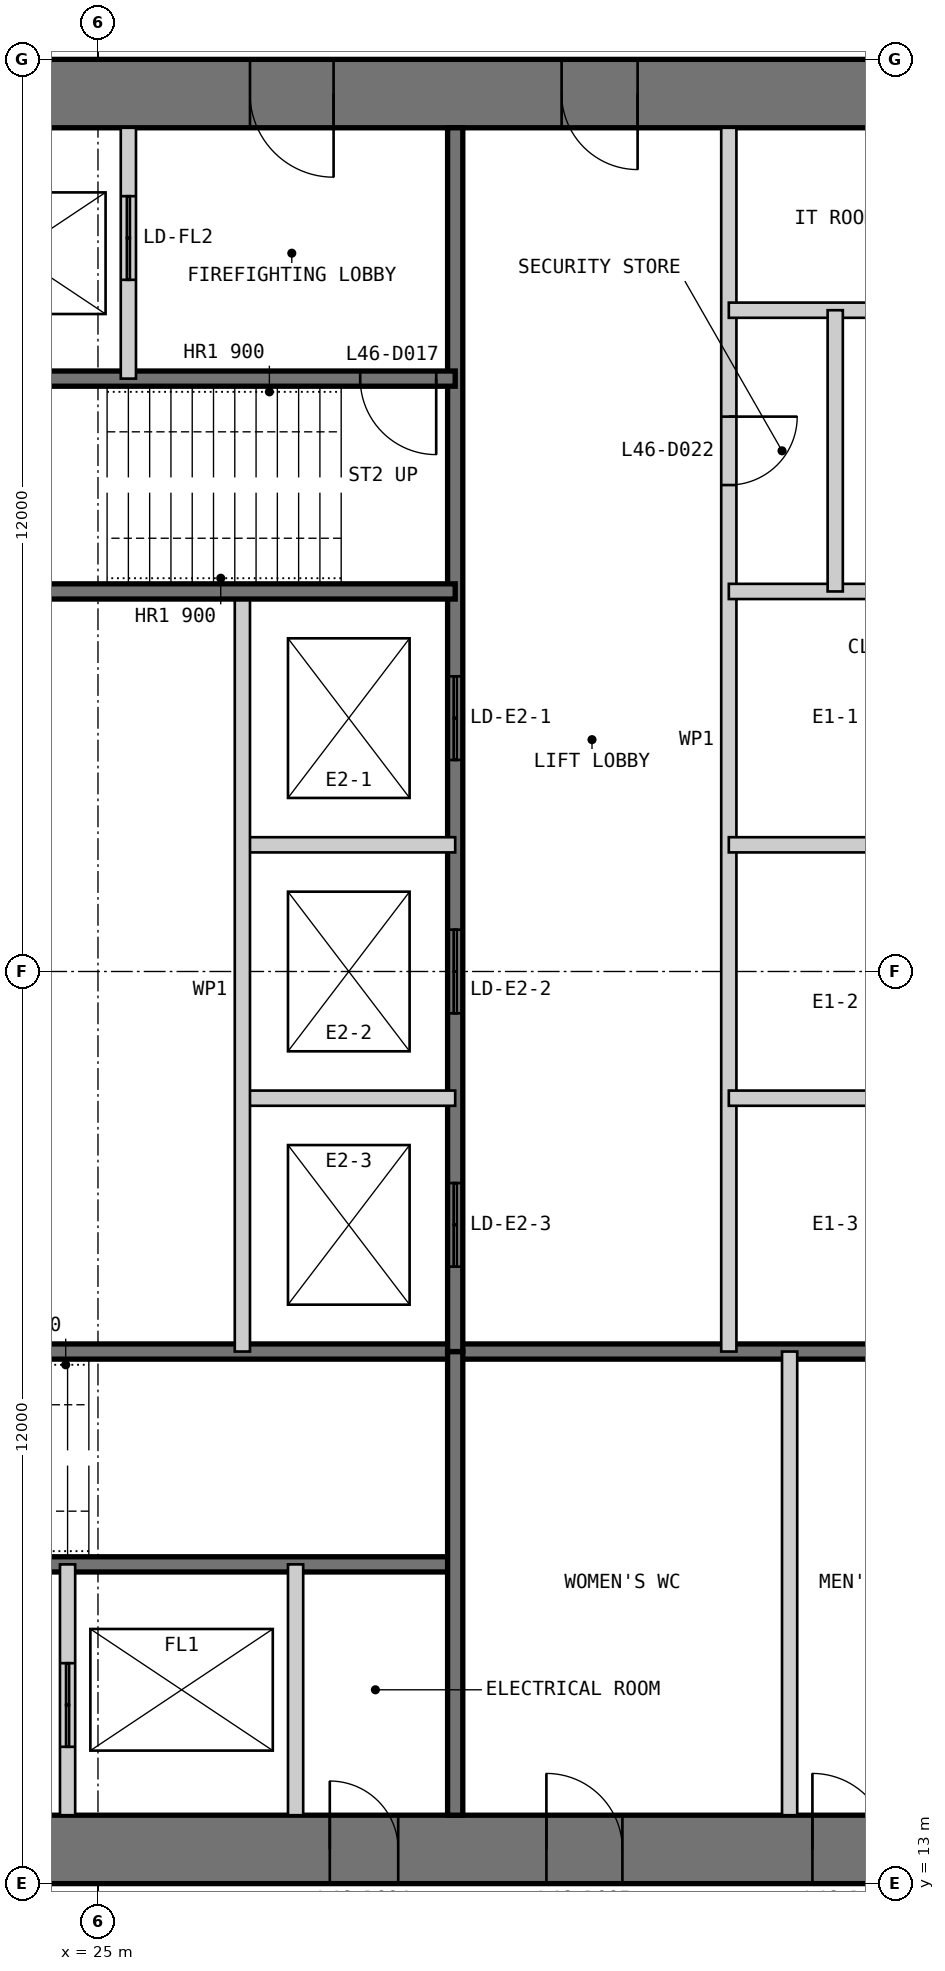
"""IFC4 building model, lengths in metres.
Left out: names, types, materials, properties, quantities, classifications, styles, units other than length and angle.
Written with IfcOpenShell. Run it as: python <this file> out.ifc"""

import sys

from ifc_helpers import new_model, si_unit, direction, frame, frame_2d, origin, place, context, subcontext, project, spatial, polyline, rectangle, outline, extrude, element, fill, save


model = new_model("IFC4")
c1 = context("Model", 3, precision=1e-05, world=origin(), true_north=direction((0.0, 1.0)))
c2 = subcontext(c1, "Body", "Model", "MODEL_VIEW")
j1 = project(units=[si_unit("LENGTHUNIT", "METRE"), si_unit("PLANEANGLEUNIT", "RADIAN")], contexts=[c1])
p1 = place(None, origin())
s1 = spatial("IfcSite", under=j1, at=p1, CompositionType="ELEMENT")
p2 = place(p1, origin())
s2 = spatial("IfcBuilding", under=s1, at=p2, CompositionType="ELEMENT")
p3 = place(p2, frame((0.0, 0.0, 197.8)))
s3 = spatial("IfcBuildingStorey", under=s2, at=p3, CompositionType="ELEMENT", Elevation=197.8)
p4 = place(p3, frame((13.0, 13.45, 0.0), z_axis=(0.0, 0.0, 1.0), x_axis=(1.0, 0.0, 0.0)))
e1 = element("IfcWall", 1, at=p4, inside=s3, PredefinedType="SHEAR", context=c2, shape_type="SweptSolid", body=[
    extrude(outline(polyline([(0.0, -0.45), (24.0, -0.45), (23.1, 0.45), (0.9, 0.45), (0.0, -0.45)])), origin(), (0.0, 0.0, 1.0), 4.0),
])
p5 = place(p4, frame((4.9, 0.0, 0.0)))
e2 = element("IfcOpeningElement", 2, at=p5, cuts=e1, PredefinedType="OPENING", context=c2, shape_type="SweptSolid", body=[
    extrude(rectangle(XDim=1.0, YDim=2.2, at=frame_2d((0.5, 1.1))), frame((0.0, 0.46, 0.0), z_axis=(0.0, -1.0, 0.0), x_axis=(1.0, 0.0, 0.0)), (0.0, 0.0, 1.0), 0.92),
])
p6 = place(p4, frame((8.9, 0.0, 0.0)))
e3 = element("IfcOpeningElement", 3, at=p6, cuts=e1, PredefinedType="OPENING", context=c2, shape_type="SweptSolid", body=[
    extrude(rectangle(XDim=1.1, YDim=2.2, at=frame_2d((0.55, 1.1))), frame((0.0, 0.46, 0.0), z_axis=(0.0, -1.0, 0.0), x_axis=(1.0, 0.0, 0.0)), (0.0, 0.0, 1.0), 0.92),
])
p7 = place(p4, frame((15.05, 0.0, 0.0)))
e4 = element("IfcOpeningElement", 4, at=p7, cuts=e1, PredefinedType="OPENING", context=c2, shape_type="SweptSolid", body=[
    extrude(rectangle(XDim=0.9, YDim=2.2, at=frame_2d((0.45, 1.1))), frame((0.0, 0.46, 0.0), z_axis=(0.0, -1.0, 0.0), x_axis=(1.0, 0.0, 0.0)), (0.0, 0.0, 1.0), 0.92),
])
p8 = place(p4, frame((17.9, 0.0, 0.0)))
e5 = element("IfcOpeningElement", 5, at=p8, cuts=e1, PredefinedType="OPENING", context=c2, shape_type="SweptSolid", body=[
    extrude(rectangle(XDim=1.0, YDim=2.2, at=frame_2d((0.5, 1.1))), frame((0.0, 0.46, 0.0), z_axis=(0.0, -1.0, 0.0), x_axis=(1.0, 0.0, 0.0)), (0.0, 0.0, 1.0), 0.92),
])
p9 = place(p4, frame((21.4, 0.0, 0.0)))
e6 = element("IfcOpeningElement", 6, at=p9, cuts=e1, PredefinedType="OPENING", context=c2, shape_type="SweptSolid", body=[
    extrude(rectangle(XDim=1.0, YDim=2.2, at=frame_2d((0.5, 1.1))), frame((0.0, 0.46, 0.0), z_axis=(0.0, -1.0, 0.0), x_axis=(1.0, 0.0, 0.0)), (0.0, 0.0, 1.0), 0.92),
])
p10 = place(p3, frame((37.0, 36.55, 0.0), z_axis=(0.0, 0.0, 1.0), x_axis=(-1.0, 0.0, 0.0)))
e7 = element("IfcWall", 7, at=p10, inside=s3, PredefinedType="SHEAR", context=c2, shape_type="SweptSolid", body=[
    extrude(outline(polyline([(0.0, -0.45), (24.0, -0.45), (23.1, 0.45), (0.9, 0.45), (0.0, -0.45)])), origin(), (0.0, 0.0, 1.0), 4.0),
])
p11 = place(p10, frame((4.9, 0.0, 0.0)))
e8 = element("IfcOpeningElement", 8, at=p11, cuts=e7, PredefinedType="OPENING", context=c2, shape_type="SweptSolid", body=[
    extrude(rectangle(XDim=1.0, YDim=2.2, at=frame_2d((0.5, 1.1))), frame((0.0, 0.46, 0.0), z_axis=(0.0, -1.0, 0.0), x_axis=(1.0, 0.0, 0.0)), (0.0, 0.0, 1.0), 0.92),
])
p12 = place(p10, frame((8.9, 0.0, 0.0)))
e9 = element("IfcOpeningElement", 9, at=p12, cuts=e7, PredefinedType="OPENING", context=c2, shape_type="SweptSolid", body=[
    extrude(rectangle(XDim=1.1, YDim=2.2, at=frame_2d((0.55, 1.1))), frame((0.0, 0.46, 0.0), z_axis=(0.0, -1.0, 0.0), x_axis=(1.0, 0.0, 0.0)), (0.0, 0.0, 1.0), 0.92),
])
p13 = place(p10, frame((15.05, 0.0, 0.0)))
e10 = element("IfcOpeningElement", 10, at=p13, cuts=e7, PredefinedType="OPENING", context=c2, shape_type="SweptSolid", body=[
    extrude(rectangle(XDim=0.9, YDim=2.2, at=frame_2d((0.45, 1.1))), frame((0.0, 0.46, 0.0), z_axis=(0.0, -1.0, 0.0), x_axis=(1.0, 0.0, 0.0)), (0.0, 0.0, 1.0), 0.92),
])
p14 = place(p10, frame((17.9, 0.0, 0.0)))
e11 = element("IfcOpeningElement", 11, at=p14, cuts=e7, PredefinedType="OPENING", context=c2, shape_type="SweptSolid", body=[
    extrude(rectangle(XDim=1.0, YDim=2.2, at=frame_2d((0.5, 1.1))), frame((0.0, 0.46, 0.0), z_axis=(0.0, -1.0, 0.0), x_axis=(1.0, 0.0, 0.0)), (0.0, 0.0, 1.0), 0.92),
])
p15 = place(p10, frame((21.4, 0.0, 0.0)))
e12 = element("IfcOpeningElement", 12, at=p15, cuts=e7, PredefinedType="OPENING", context=c2, shape_type="SweptSolid", body=[
    extrude(rectangle(XDim=1.0, YDim=2.2, at=frame_2d((0.5, 1.1))), frame((0.0, 0.46, 0.0), z_axis=(0.0, -1.0, 0.0), x_axis=(1.0, 0.0, 0.0)), (0.0, 0.0, 1.0), 0.92),
])
p16 = place(p3, frame((20.3, 17.2, 0.0), z_axis=(0.0, 0.0, 1.0), x_axis=(1.0, 0.0, 0.0)))
e13 = element("IfcWall", 13, at=p16, inside=s3, PredefinedType="SOLIDWALL", context=c2, shape_type="SweptSolid", body=[
    extrude(rectangle(XDim=9.4, YDim=0.2, at=frame_2d((4.7, 0.0))), origin(), (0.0, 0.0, 1.0), 3.8),
])
p17 = place(p16, frame((0.25, 0.0, 0.0)))
e14 = element("IfcOpeningElement", 14, at=p17, cuts=e13, PredefinedType="OPENING", context=c2, shape_type="SweptSolid", body=[
    extrude(rectangle(XDim=1.0, YDim=2.2, at=frame_2d((0.5, 1.1))), frame((0.0, 0.11, 0.0), z_axis=(0.0, -1.0, 0.0), x_axis=(1.0, 0.0, 0.0)), (0.0, 0.0, 1.0), 0.22),
])
p18 = place(p3, frame((20.3, 20.0, 0.0), z_axis=(0.0, 0.0, 1.0), x_axis=(1.0, 0.0, 0.0)))
e15 = element("IfcWall", 15, at=p18, inside=s3, PredefinedType="SOLIDWALL", context=c2, shape_type="SweptSolid", body=[
    extrude(rectangle(XDim=15.8, YDim=0.2, at=frame_2d((7.9, 0.0))), origin(), (0.0, 0.0, 1.0), 3.8),
])
p19 = place(p3, frame((24.6, 13.9, 0.0), z_axis=(0.0, 0.0, 1.0), x_axis=(0.0, 1.0, 0.0)))
e16 = element("IfcWall", 16, at=p19, inside=s3, PredefinedType="PARTITIONING", context=c2, shape_type="SweptSolid", body=[
    extrude(rectangle(XDim=3.3, YDim=0.2, at=frame_2d((1.65, 0.0))), origin(), (0.0, 0.0, 1.0), 3.8),
])
p20 = place(p19, frame((0.9, 0.0, 0.0)))
e17 = element("IfcOpeningElement", 17, at=p20, cuts=e16, PredefinedType="OPENING", context=c2, shape_type="SweptSolid", body=[
    extrude(rectangle(XDim=1.1, YDim=2.2, at=frame_2d((0.55, 1.1))), frame((0.0, 0.11, 0.0), z_axis=(0.0, -1.0, 0.0), x_axis=(1.0, 0.0, 0.0)), (0.0, 0.0, 1.0), 0.22),
])
p21 = place(p3, frame((27.6, 13.9, 0.0), z_axis=(0.0, 0.0, 1.0), x_axis=(0.0, 1.0, 0.0)))
e18 = element("IfcWall", 18, at=p21, inside=s3, PredefinedType="PARTITIONING", context=c2, shape_type="SweptSolid", body=[
    extrude(rectangle(XDim=3.3, YDim=0.2, at=frame_2d((1.65, 0.0))), origin(), (0.0, 0.0, 1.0), 3.8),
])
p22 = place(p3, frame((29.7, 13.9, 0.0), z_axis=(0.0, 0.0, 1.0), x_axis=(0.0, 1.0, 0.0)))
e19 = element("IfcWall", 19, at=p22, inside=s3, PredefinedType="SOLIDWALL", context=c2, shape_type="SweptSolid", body=[
    extrude(rectangle(XDim=6.1, YDim=0.2, at=frame_2d((3.05, 0.0))), origin(), (0.0, 0.0, 1.0), 3.8),
])
p23 = place(p3, frame((34.1, 13.9, 0.0), z_axis=(0.0, 0.0, 1.0), x_axis=(0.0, 1.0, 0.0)))
e20 = element("IfcWall", 20, at=p23, inside=s3, PredefinedType="PARTITIONING", context=c2, shape_type="SweptSolid", body=[
    extrude(rectangle(XDim=6.1, YDim=0.2, at=frame_2d((3.05, 0.0))), origin(), (0.0, 0.0, 1.0), 3.8),
])
p24 = place(p3, frame((33.3, 36.1, 0.0), z_axis=(0.0, 0.0, 1.0), x_axis=(0.0, -1.0, 0.0)))
e21 = element("IfcWall", 21, at=p24, inside=s3, PredefinedType="PARTITIONING", context=c2, shape_type="SweptSolid", body=[
    extrude(rectangle(XDim=16.1, YDim=0.2, at=frame_2d((8.05, 0.0))), origin(), (0.0, 0.0, 1.0), 3.8),
])
p25 = place(p24, frame((3.8, 0.0, 0.0)))
e22 = element("IfcOpeningElement", 22, at=p25, cuts=e21, PredefinedType="OPENING", context=c2, shape_type="SweptSolid", body=[
    extrude(rectangle(XDim=0.9, YDim=2.2, at=frame_2d((0.45, 1.1))), frame((0.0, 0.11, 0.0), z_axis=(0.0, -1.0, 0.0), x_axis=(1.0, 0.0, 0.0)), (0.0, 0.0, 1.0), 0.22),
])
p26 = place(p3, frame((29.7, 36.1, 0.0), z_axis=(0.0, 0.0, 1.0), x_axis=(0.0, -1.0, 0.0)))
e23 = element("IfcWall", 23, at=p26, inside=s3, PredefinedType="SOLIDWALL", context=c2, shape_type="SweptSolid", body=[
    extrude(rectangle(XDim=16.1, YDim=0.2, at=frame_2d((8.05, 0.0))), origin(), (0.0, 0.0, 1.0), 3.8),
])
p27 = place(p26, frame((7.217, 0.0, 0.0)))
e24 = element("IfcOpeningElement", 24, at=p27, cuts=e23, PredefinedType="OPENING", context=c2, shape_type="SweptSolid", body=[
    extrude(rectangle(XDim=1.1, YDim=2.2, at=frame_2d((0.55, 1.1))), frame((0.0, 0.11, 0.0), z_axis=(0.0, -1.0, 0.0), x_axis=(1.0, 0.0, 0.0)), (0.0, 0.0, 1.0), 0.22),
])
p28 = place(p26, frame((10.55, 0.0, 0.0)))
e25 = element("IfcOpeningElement", 25, at=p28, cuts=e23, PredefinedType="OPENING", context=c2, shape_type="SweptSolid", body=[
    extrude(rectangle(XDim=1.1, YDim=2.2, at=frame_2d((0.55, 1.1))), frame((0.0, 0.11, 0.0), z_axis=(0.0, -1.0, 0.0), x_axis=(1.0, 0.0, 0.0)), (0.0, 0.0, 1.0), 0.22),
])
p29 = place(p26, frame((13.883, 0.0, 0.0)))
e26 = element("IfcOpeningElement", 26, at=p29, cuts=e23, PredefinedType="OPENING", context=c2, shape_type="SweptSolid", body=[
    extrude(rectangle(XDim=1.1, YDim=2.2, at=frame_2d((0.55, 1.1))), frame((0.0, 0.11, 0.0), z_axis=(0.0, -1.0, 0.0), x_axis=(1.0, 0.0, 0.0)), (0.0, 0.0, 1.0), 0.22),
])
for number, where, z_axis, x_axis in (
    (27, (36.1, 30.0, 0.0), (0.0, 0.0, 1.0), (-1.0, 0.0, 0.0)),
    (28, (36.1, 26.667, 0.0), (0.0, 0.0, 1.0), (-1.0, 0.0, 0.0)),
    (29, (36.1, 23.333, 0.0), (0.0, 0.0, 1.0), (-1.0, 0.0, 0.0)),
    (30, (29.7, 26.667, 0.0), (0.0, 0.0, 1.0), (-1.0, 0.0, 0.0)),
    (31, (29.7, 23.333, 0.0), (0.0, 0.0, 1.0), (-1.0, 0.0, 0.0)),
):
    element("IfcWall", number, at=place(p3, frame(where, z_axis=z_axis, x_axis=x_axis)), inside=s3, PredefinedType="PARTITIONING", context=c2, shape_type="SweptSolid", body=[
        extrude(rectangle(XDim=2.8, YDim=0.2, at=frame_2d((1.4, 0.0))), origin(), (0.0, 0.0, 1.0), 3.8),
    ])
p30 = place(p3, frame((26.9, 30.0, 0.0), z_axis=(0.0, 0.0, 1.0), x_axis=(0.0, -1.0, 0.0)))
e32 = element("IfcWall", 32, at=p30, inside=s3, PredefinedType="PARTITIONING", context=c2, shape_type="SweptSolid", body=[
    extrude(rectangle(XDim=10.0, YDim=0.2, at=frame_2d((5.0, 0.0))), origin(), (0.0, 0.0, 1.0), 3.8),
])
p31 = place(p3, frame((29.7, 32.8, 0.0), z_axis=(0.0, 0.0, 1.0), x_axis=(-1.0, 0.0, 0.0)))
e33 = element("IfcWall", 33, at=p31, inside=s3, PredefinedType="SOLIDWALL", context=c2, shape_type="SweptSolid", body=[
    extrude(rectangle(XDim=9.4, YDim=0.2, at=frame_2d((4.7, 0.0))), origin(), (0.0, 0.0, 1.0), 3.8),
])
p32 = place(p31, frame((0.25, 0.0, 0.0)))
e34 = element("IfcOpeningElement", 34, at=p32, cuts=e33, PredefinedType="OPENING", context=c2, shape_type="SweptSolid", body=[
    extrude(rectangle(XDim=1.0, YDim=2.2, at=frame_2d((0.5, 1.1))), frame((0.0, 0.11, 0.0), z_axis=(0.0, -1.0, 0.0), x_axis=(1.0, 0.0, 0.0)), (0.0, 0.0, 1.0), 0.22),
])
p33 = place(p3, frame((29.7, 30.0, 0.0), z_axis=(0.0, 0.0, 1.0), x_axis=(-1.0, 0.0, 0.0)))
e35 = element("IfcWall", 35, at=p33, inside=s3, PredefinedType="SOLIDWALL", context=c2, shape_type="SweptSolid", body=[
    extrude(rectangle(XDim=15.8, YDim=0.2, at=frame_2d((7.9, 0.0))), origin(), (0.0, 0.0, 1.0), 3.8),
])
p34 = place(p3, frame((25.4, 36.1, 0.0), z_axis=(0.0, 0.0, 1.0), x_axis=(0.0, -1.0, 0.0)))
e36 = element("IfcWall", 36, at=p34, inside=s3, PredefinedType="PARTITIONING", context=c2, shape_type="SweptSolid", body=[
    extrude(rectangle(XDim=3.3, YDim=0.2, at=frame_2d((1.65, 0.0))), origin(), (0.0, 0.0, 1.0), 3.8),
])
p35 = place(p34, frame((0.9, 0.0, 0.0)))
e37 = element("IfcOpeningElement", 37, at=p35, cuts=e36, PredefinedType="OPENING", context=c2, shape_type="SweptSolid", body=[
    extrude(rectangle(XDim=1.1, YDim=2.2, at=frame_2d((0.55, 1.1))), frame((0.0, 0.11, 0.0), z_axis=(0.0, -1.0, 0.0), x_axis=(1.0, 0.0, 0.0)), (0.0, 0.0, 1.0), 0.22),
])
p36 = place(p3, frame((36.1, 33.7, 0.0), z_axis=(0.0, 0.0, 1.0), x_axis=(-1.0, 0.0, 0.0)))
e38 = element("IfcWall", 38, at=p36, inside=s3, PredefinedType="PARTITIONING", context=c2, shape_type="SweptSolid", body=[
    extrude(rectangle(XDim=2.8, YDim=0.2, at=frame_2d((1.4, 0.0))), origin(), (0.0, 0.0, 1.0), 3.8),
])
p37 = place(p3, frame((34.7, 33.7, 0.0), z_axis=(0.0, 0.0, 1.0), x_axis=(0.0, -1.0, 0.0)))
e39 = element("IfcWall", 39, at=p37, inside=s3, PredefinedType="PARTITIONING", context=c2, shape_type="SweptSolid", body=[
    extrude(rectangle(XDim=3.7, YDim=0.2, at=frame_2d((1.85, 0.0))), origin(), (0.0, 0.0, 1.0), 3.8),
])
p38 = place(p7, origin())
e40 = element("IfcDoor", 40, at=p38, inside=s3, OperationType="SINGLE_SWING_LEFT", PredefinedType="DOOR", context=c2, shape_type="SweptSolid", body=[
    extrude(rectangle(XDim=0.9, YDim=2.2, at=frame_2d((0.45, 1.1))), frame((0.0, 0.025, 0.0), z_axis=(0.0, -1.0, 0.0), x_axis=(1.0, 0.0, 0.0)), (0.0, 0.0, 1.0), 0.05),
    extrude(outline(polyline([(0.0, 0.0), (0.04, 0.0), (0.04, 2.16), (0.86, 2.16), (0.86, 0.0), (0.9, 0.0), (0.9, 2.2), (0.0, 2.2), (0.0, 0.0)])), frame((0.0, 0.3, 0.0), z_axis=(0.0, -1.0, 0.0), x_axis=(1.0, 0.0, 0.0)), (0.0, 0.0, 1.0), 0.6),
])
fill(e4, e40)
p39 = place(p8, origin())
e41 = element("IfcDoor", 41, at=p39, inside=s3, OperationType="SINGLE_SWING_LEFT", PredefinedType="DOOR", context=c2, shape_type="SweptSolid", body=[
    extrude(rectangle(XDim=1.0, YDim=2.2, at=frame_2d((0.5, 1.1))), frame((0.0, 0.025, 0.0), z_axis=(0.0, -1.0, 0.0), x_axis=(1.0, 0.0, 0.0)), (0.0, 0.0, 1.0), 0.05),
    extrude(outline(polyline([(0.0, 0.0), (0.04, 0.0), (0.04, 2.16), (0.96, 2.16), (0.96, 0.0), (1.0, 0.0), (1.0, 2.2), (0.0, 2.2), (0.0, 0.0)])), frame((0.0, 0.3, 0.0), z_axis=(0.0, -1.0, 0.0), x_axis=(1.0, 0.0, 0.0)), (0.0, 0.0, 1.0), 0.6),
])
fill(e5, e41)
p40 = place(p9, origin())
e42 = element("IfcDoor", 42, at=p40, inside=s3, OperationType="SINGLE_SWING_LEFT", PredefinedType="DOOR", context=c2, shape_type="SweptSolid", body=[
    extrude(rectangle(XDim=1.0, YDim=2.2, at=frame_2d((0.5, 1.1))), frame((0.0, 0.025, 0.0), z_axis=(0.0, -1.0, 0.0), x_axis=(1.0, 0.0, 0.0)), (0.0, 0.0, 1.0), 0.05),
    extrude(outline(polyline([(0.0, 0.0), (0.04, 0.0), (0.04, 2.16), (0.96, 2.16), (0.96, 0.0), (1.0, 0.0), (1.0, 2.2), (0.0, 2.2), (0.0, 0.0)])), frame((0.0, 0.3, 0.0), z_axis=(0.0, -1.0, 0.0), x_axis=(1.0, 0.0, 0.0)), (0.0, 0.0, 1.0), 0.6),
])
fill(e6, e42)
p41 = place(p11, origin())
e43 = element("IfcDoor", 43, at=p41, inside=s3, OperationType="SINGLE_SWING_LEFT", PredefinedType="DOOR", context=c2, shape_type="SweptSolid", body=[
    extrude(rectangle(XDim=1.0, YDim=2.2, at=frame_2d((0.5, 1.1))), frame((0.0, 0.025, 0.0), z_axis=(0.0, -1.0, 0.0), x_axis=(1.0, 0.0, 0.0)), (0.0, 0.0, 1.0), 0.05),
    extrude(outline(polyline([(0.0, 0.0), (0.04, 0.0), (0.04, 2.16), (0.96, 2.16), (0.96, 0.0), (1.0, 0.0), (1.0, 2.2), (0.0, 2.2), (0.0, 0.0)])), frame((0.0, 0.3, 0.0), z_axis=(0.0, -1.0, 0.0), x_axis=(1.0, 0.0, 0.0)), (0.0, 0.0, 1.0), 0.6),
])
fill(e8, e43)
p42 = place(p12, origin())
e44 = element("IfcDoor", 44, at=p42, inside=s3, OperationType="SINGLE_SWING_LEFT", PredefinedType="DOOR", context=c2, shape_type="SweptSolid", body=[
    extrude(rectangle(XDim=1.1, YDim=2.2, at=frame_2d((0.55, 1.1))), frame((0.0, 0.025, 0.0), z_axis=(0.0, -1.0, 0.0), x_axis=(1.0, 0.0, 0.0)), (0.0, 0.0, 1.0), 0.05),
    extrude(outline(polyline([(0.0, 0.0), (0.04, 0.0), (0.04, 2.16), (1.06, 2.16), (1.06, 0.0), (1.1, 0.0), (1.1, 2.2), (0.0, 2.2), (0.0, 0.0)])), frame((0.0, 0.3, 0.0), z_axis=(0.0, -1.0, 0.0), x_axis=(1.0, 0.0, 0.0)), (0.0, 0.0, 1.0), 0.6),
])
fill(e9, e44)
p43 = place(p32, origin())
e45 = element("IfcDoor", 45, at=p43, inside=s3, OperationType="SINGLE_SWING_LEFT", PredefinedType="DOOR", context=c2, shape_type="SweptSolid", body=[
    extrude(rectangle(XDim=1.0, YDim=2.2, at=frame_2d((0.5, 1.1))), frame((0.0, 0.025, 0.0), z_axis=(0.0, -1.0, 0.0), x_axis=(1.0, 0.0, 0.0)), (0.0, 0.0, 1.0), 0.05),
])
fill(e34, e45)
p44 = place(p25, origin())
e46 = element("IfcDoor", 46, at=p44, inside=s3, OperationType="SINGLE_SWING_LEFT", PredefinedType="DOOR", context=c2, shape_type="SweptSolid", body=[
    extrude(rectangle(XDim=0.9, YDim=2.2, at=frame_2d((0.45, 1.1))), frame((0.0, 0.025, 0.0), z_axis=(0.0, -1.0, 0.0), x_axis=(1.0, 0.0, 0.0)), (0.0, 0.0, 1.0), 0.05),
])
fill(e22, e46)
p45 = place(p20, origin())
e47 = element("IfcDoor", 47, at=p45, inside=s3, OperationType="DOUBLE_DOOR_SLIDING", PredefinedType="DOOR", context=c2, shape_type="SweptSolid", body=[
    extrude(rectangle(XDim=1.1, YDim=2.2, at=frame_2d((0.55, 1.1))), frame((0.0, 0.025, 0.0), z_axis=(0.0, -1.0, 0.0), x_axis=(1.0, 0.0, 0.0)), (0.0, 0.0, 1.0), 0.05),
])
fill(e17, e47)
p46 = place(p35, origin())
e48 = element("IfcDoor", 48, at=p46, inside=s3, OperationType="DOUBLE_DOOR_SLIDING", PredefinedType="DOOR", context=c2, shape_type="SweptSolid", body=[
    extrude(rectangle(XDim=1.1, YDim=2.2, at=frame_2d((0.55, 1.1))), frame((0.0, 0.025, 0.0), z_axis=(0.0, -1.0, 0.0), x_axis=(1.0, 0.0, 0.0)), (0.0, 0.0, 1.0), 0.05),
])
fill(e37, e48)
p47 = place(p27, origin())
e49 = element("IfcDoor", 49, at=p47, inside=s3, OperationType="DOUBLE_DOOR_SLIDING", PredefinedType="DOOR", context=c2, shape_type="SweptSolid", body=[
    extrude(rectangle(XDim=1.1, YDim=2.2, at=frame_2d((0.55, 1.1))), frame((0.0, 0.025, 0.0), z_axis=(0.0, -1.0, 0.0), x_axis=(1.0, 0.0, 0.0)), (0.0, 0.0, 1.0), 0.05),
])
fill(e24, e49)
p48 = place(p28, origin())
e50 = element("IfcDoor", 50, at=p48, inside=s3, OperationType="DOUBLE_DOOR_SLIDING", PredefinedType="DOOR", context=c2, shape_type="SweptSolid", body=[
    extrude(rectangle(XDim=1.1, YDim=2.2, at=frame_2d((0.55, 1.1))), frame((0.0, 0.025, 0.0), z_axis=(0.0, -1.0, 0.0), x_axis=(1.0, 0.0, 0.0)), (0.0, 0.0, 1.0), 0.05),
])
fill(e25, e50)
p49 = place(p29, origin())
e51 = element("IfcDoor", 51, at=p49, inside=s3, OperationType="DOUBLE_DOOR_SLIDING", PredefinedType="DOOR", context=c2, shape_type="SweptSolid", body=[
    extrude(rectangle(XDim=1.1, YDim=2.2, at=frame_2d((0.55, 1.1))), frame((0.0, 0.025, 0.0), z_axis=(0.0, -1.0, 0.0), x_axis=(1.0, 0.0, 0.0)), (0.0, 0.0, 1.0), 0.05),
])
fill(e26, e51)
save(model, sys.argv[1])
